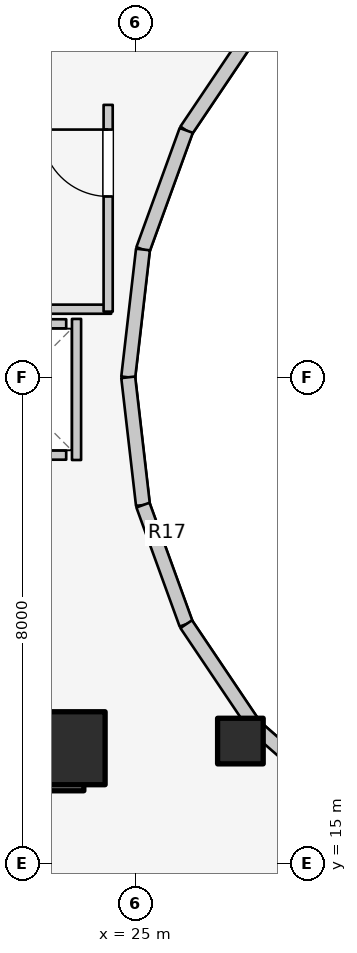
"""IFC4 building model, lengths in metres.
Left out: names, types, materials, properties, quantities, classifications, styles, units other than length and angle.
Written with IfcOpenShell. Run it as: python <this file> out.ifc"""

import sys

from ifc_helpers import new_model, si_unit, direction, frame, frame_2d, origin, origin_2d, place, context, subcontext, project, spatial, rectangle, extrude, element, fill, save


model = new_model("IFC4")
c1 = context("Model", 3, precision=1e-05, world=origin(), true_north=direction((0.0, 1.0)))
c2 = subcontext(c1, "Body", "Model", "MODEL_VIEW")
j1 = project(units=[si_unit("LENGTHUNIT", "METRE"), si_unit("PLANEANGLEUNIT", "RADIAN")], contexts=[c1])
p1 = place(None, origin())
s1 = spatial("IfcSite", under=j1, at=p1, CompositionType="ELEMENT")
p2 = place(p1, origin())
s2 = spatial("IfcBuilding", under=s1, at=p2, CompositionType="ELEMENT")
p3 = place(p2, frame((0.0, 0.0, 149.8)))
s3 = spatial("IfcBuildingStorey", under=s2, at=p3, CompositionType="ELEMENT", Elevation=149.8)
p4 = place(p3, frame((19.65, 16.55, 0.0), z_axis=(0.0, 0.0, 1.0), x_axis=(1.0, 0.0, 0.0)))
e1 = element("IfcWall", 1, at=p4, inside=s3, PredefinedType="SHEAR", context=c2, shape_type="SweptSolid", body=[
    extrude(rectangle(XDim=4.5, YDim=0.7, at=frame_2d((2.25, 0.0))), origin(), (0.0, 0.0, 1.0), 3.1),
])
p5 = place(p3, frame((23.9, 16.9, 0.0), z_axis=(0.0, 0.0, 1.0), x_axis=(1.0, 0.0, 0.0)))
e2 = element("IfcColumn", 2, at=p5, inside=s3, PredefinedType="COLUMN", context=c2, shape_type="SweptSolid", body=[
    extrude(rectangle(XDim=1.2, YDim=1.2, at=origin_2d()), origin(), (0.0, 0.0, 1.0), 3.1),
])
p6 = place(p3, frame((26.725, 17.018, 0.0), z_axis=(0.0, 0.0, 1.0), x_axis=(1.0, 0.0, 0.0)))
e3 = element("IfcColumn", 3, at=p6, inside=s3, PredefinedType="COLUMN", context=c2, shape_type="SweptSolid", body=[
    extrude(rectangle(XDim=0.75, YDim=0.75, at=origin_2d()), origin(), (0.0, 0.0, 1.0), 3.1),
])
p7 = place(p3, frame((26.965, 28.742, 0.0), z_axis=(0.0, 0.0, 1.0), x_axis=(-0.558197800898, -0.829707909492, 0.0)))
e4 = element("IfcWall", 4, at=p7, inside=s3, PredefinedType="STANDARD", context=c2, shape_type="SweptSolid", body=[
    extrude(rectangle(XDim=2.027, YDim=0.23, at=frame_2d((1.013, 0.0))), origin(), (0.0, 0.0, 1.0), 1.22),
])
p8 = place(p3, frame((25.834, 27.06, 0.0), z_axis=(0.0, 0.0, 1.0), x_axis=(-0.341423187295, -0.93990968033, 0.0)))
e5 = element("IfcWall", 5, at=p8, inside=s3, PredefinedType="STANDARD", context=c2, shape_type="SweptSolid", body=[
    extrude(rectangle(XDim=2.084, YDim=0.23, at=frame_2d((1.042, 0.0))), origin(), (0.0, 0.0, 1.0), 2.56),
])
for number, where, z_axis, x_axis in (
    (6, (25.123, 25.102, 0.0), (0.0, 0.0, 1.0), (-0.115, -0.993, 0.0)),
    (7, (24.88, 23.0, 0.0), (0.0, 0.0, 1.0), (0.115, -0.993, 0.0)),
):
    element("IfcWall", number, at=place(p3, frame(where, z_axis=z_axis, x_axis=x_axis)), inside=s3, PredefinedType="STANDARD", context=c2, shape_type="SweptSolid", body=[
        extrude(rectangle(XDim=2.115, YDim=0.23, at=frame_2d((1.058, 0.0))), origin(), (0.0, 0.0, 1.0), 2.56),
    ])
p9 = place(p3, frame((25.123, 20.898, 0.0), z_axis=(0.0, 0.0, 1.0), x_axis=(0.341423187295, -0.93990968033, 0.0)))
e8 = element("IfcWall", 8, at=p9, inside=s3, PredefinedType="STANDARD", context=c2, shape_type="SweptSolid", body=[
    extrude(rectangle(XDim=2.084, YDim=0.23, at=frame_2d((1.042, 0.0))), origin(), (0.0, 0.0, 1.0), 2.56),
])
p10 = place(p3, frame((25.834, 18.94, 0.0), z_axis=(0.0, 0.0, 1.0), x_axis=(0.558197800898, -0.829707909492, 0.0)))
e9 = element("IfcWall", 9, at=p10, inside=s3, PredefinedType="STANDARD", context=c2, shape_type="SweptSolid", body=[
    extrude(rectangle(XDim=2.027, YDim=0.23, at=frame_2d((1.013, 0.0))), origin(), (0.0, 0.0, 1.0), 1.22),
])
p11 = place(p3, frame((26.965, 17.258, 0.0), z_axis=(0.0, 0.0, 1.0), x_axis=(0.752576694707, -0.658504607869, 0.0)))
e10 = element("IfcWall", 10, at=p11, inside=s3, PredefinedType="STANDARD", context=c2, shape_type="SweptSolid", body=[
    extrude(rectangle(XDim=1.959, YDim=0.23, at=frame_2d((0.98, 0.0))), origin(), (0.0, 0.0, 1.0), 1.22),
])
for number, where, z_axis, x_axis in (
    (11, (22.04, 21.72, 0.0), (0.0, 0.0, 1.0), (1.0, 0.0, 0.0)),
    (12, (22.04, 23.88, 0.0), (0.0, 0.0, 1.0), (1.0, 0.0, 0.0)),
):
    element("IfcWall", number, at=place(p3, frame(where, z_axis=z_axis, x_axis=x_axis)), inside=s3, PredefinedType="SOLIDWALL", context=c2, shape_type="SweptSolid", body=[
        extrude(rectangle(XDim=1.82, YDim=0.15, at=frame_2d((0.91, 0.0))), origin(), (0.0, 0.0, 1.0), 2.12),
    ])
p12 = place(p3, frame((24.03, 21.64, 0.0), z_axis=(0.0, 0.0, 1.0), x_axis=(0.0, 1.0, 0.0)))
e13 = element("IfcWall", 13, at=p12, inside=s3, PredefinedType="SOLIDWALL", context=c2, shape_type="SweptSolid", body=[
    extrude(rectangle(XDim=2.32, YDim=0.15, at=frame_2d((1.16, 0.0))), origin(), (0.0, 0.0, 1.0), 2.12),
])
p13 = place(p3, frame((19.52, 24.12, 0.0), z_axis=(0.0, 0.0, 1.0), x_axis=(1.0, 0.0, 0.0)))
e14 = element("IfcWall", 14, at=p13, inside=s3, PredefinedType="PARTITIONING", context=c2, shape_type="SweptSolid", body=[
    extrude(rectangle(XDim=5.08, YDim=0.15, at=frame_2d((2.54, 0.0))), origin(), (0.0, 0.0, 1.0), 2.12),
])
p14 = place(p3, frame((24.55, 24.08, 0.0), z_axis=(0.0, 0.0, 1.0), x_axis=(0.0, 1.0, 0.0)))
e15 = element("IfcWall", 15, at=p14, inside=s3, PredefinedType="PARTITIONING", context=c2, shape_type="SweptSolid", body=[
    extrude(rectangle(XDim=3.4, YDim=0.15, at=frame_2d((1.7, 0.0))), origin(), (0.0, 0.0, 1.0), 2.575),
])
p15 = place(p14, frame((1.894, 0.0, 0.0)))
e16 = element("IfcOpeningElement", 16, at=p15, cuts=e15, PredefinedType="OPENING", context=c2, shape_type="SweptSolid", body=[
    extrude(rectangle(XDim=1.1, YDim=2.1, at=frame_2d((0.55, 1.05))), frame((0.0, 0.085, 0.0), z_axis=(0.0, -1.0, 0.0), x_axis=(1.0, 0.0, 0.0)), (0.0, 0.0, 1.0), 0.17),
])
p16 = place(p3, frame((28.45, 15.985, 0.0), z_axis=(0.0, 0.0, 1.0), x_axis=(-0.523587550846, -0.851971875474, 0.0)))
e17 = element("IfcWall", 17, at=p16, inside=s3, PredefinedType="PARTITIONING", context=c2, shape_type="SweptSolid", body=[
    extrude(rectangle(XDim=3.153, YDim=0.125, at=frame_2d((1.577, 0.0))), origin(), (0.0, 0.0, 1.0), 1.22),
])
p17 = place(p15, origin())
e18 = element("IfcDoor", 18, at=p17, inside=s3, OperationType="SINGLE_SWING_RIGHT", PredefinedType="DOOR", context=c2, shape_type="SweptSolid", body=[
    extrude(rectangle(XDim=1.1, YDim=2.1, at=frame_2d((0.55, 1.05))), frame((0.0, 0.025, 0.0), z_axis=(0.0, -1.0, 0.0), x_axis=(1.0, 0.0, 0.0)), (0.0, 0.0, 1.0), 0.05),
])
fill(e16, e18)
save(model, sys.argv[1])
